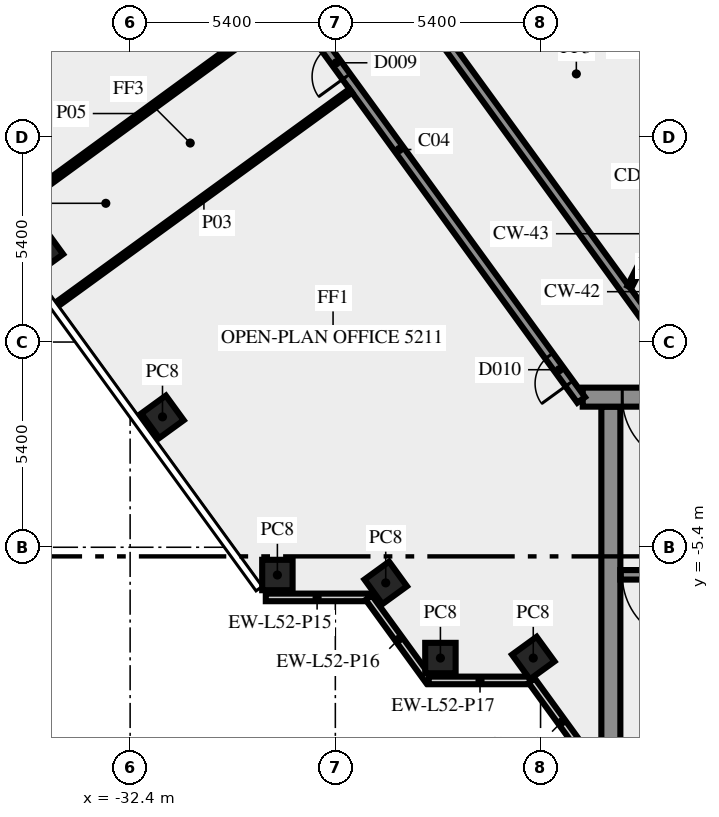
"""IFC4 building model, lengths in metres.
Left out: names, types, materials, properties, quantities, classifications, styles, units other than length and angle.
Written with IfcOpenShell. Run it as: python <this file> out.ifc"""

import sys

from ifc_helpers import new_model, si_unit, direction, frame, frame_2d, origin, origin_2d, place, context, subcontext, project, spatial, rectangle, extrude, element, fill, save


model = new_model("IFC4")
c1 = context("Model", 3, precision=1e-05, world=origin(), true_north=direction((0.0, 1.0)))
c2 = subcontext(c1, "Body", "Model", "MODEL_VIEW")
j1 = project(units=[si_unit("LENGTHUNIT", "METRE"), si_unit("PLANEANGLEUNIT", "RADIAN")], contexts=[c1])
p1 = place(None, origin())
s1 = spatial("IfcSite", under=j1, at=p1, CompositionType="ELEMENT")
p2 = place(p1, origin())
s2 = spatial("IfcBuilding", under=s1, at=p2, CompositionType="ELEMENT")
p3 = place(p2, frame((0.0, 0.0, 222.0)))
s3 = spatial("IfcBuildingStorey", under=s2, at=p3, CompositionType="ELEMENT", Elevation=222.0)
for number, where, z_axis, x_axis in (
    (1, (-34.722, 2.4, 0.0), (0.0, 0.0, 1.0), (0.588, -0.809, 0.0)),
    (2, (-31.548, -1.969, 0.0), (0.0, 0.0, 1.0), (0.588, -0.809, 0.0)),
    (3, (-28.525, -6.13, 0.0), (0.0, 0.0, 1.0), (1.0, 0.0, 0.0)),
    (4, (-25.674, -6.337, 0.0), (0.0, 0.0, 1.0), (0.588, -0.809, 0.0)),
    (5, (-24.235, -8.315, 0.0), (0.0, 0.0, 1.0), (1.0, 0.0, 0.0)),
    (6, (-21.792, -8.315, 0.0), (0.0, 0.0, 1.0), (0.588, -0.809, 0.0)),
):
    element("IfcColumn", number, at=place(p3, frame(where, z_axis=z_axis, x_axis=x_axis)), inside=s3, PredefinedType="COLUMN", context=c2, shape_type="SweptSolid", body=[
        extrude(rectangle(XDim=0.8, YDim=0.8, at=origin_2d()), origin(), (0.0, 0.0, 1.0), 3.65),
    ])
p4 = place(p3, frame((-28.83, -6.719, 0.0), z_axis=(0.0, 0.0, 1.0), x_axis=(1.0, 0.0, 0.0)))
e7 = element("IfcWall", 7, at=p4, inside=s3, PredefinedType="SOLIDWALL", context=c2, shape_type="SweptSolid", body=[
    extrude(rectangle(XDim=2.7, YDim=0.2, at=frame_2d((1.35, 0.0))), origin(), (0.0, 0.0, 1.0), 3.65),
])
p5 = place(p3, frame((-26.12, -6.724, 0.0), z_axis=(0.0, 0.0, 1.0), x_axis=(0.587720002413, -0.809064397168, 0.0)))
e8 = element("IfcWall", 8, at=p5, inside=s3, PredefinedType="SOLIDWALL", context=c2, shape_type="SweptSolid", body=[
    extrude(rectangle(XDim=2.7, YDim=0.2, at=frame_2d((1.35, 0.0))), origin(), (0.0, 0.0, 1.0), 3.65),
])
p6 = place(p3, frame((-24.543, -8.904, 0.0), z_axis=(0.0, 0.0, 1.0), x_axis=(1.0, 0.0, 0.0)))
e9 = element("IfcWall", 9, at=p6, inside=s3, PredefinedType="SOLIDWALL", context=c2, shape_type="SweptSolid", body=[
    extrude(rectangle(XDim=2.7, YDim=0.2, at=frame_2d((1.35, 0.0))), origin(), (0.0, 0.0, 1.0), 3.65),
])
p7 = place(p3, frame((-21.833, -8.909, 0.0), z_axis=(0.0, 0.0, 1.0), x_axis=(0.587766567315, -0.809030569476, 0.0)))
e10 = element("IfcWall", 10, at=p7, inside=s3, PredefinedType="SOLIDWALL", context=c2, shape_type="SweptSolid", body=[
    extrude(rectangle(XDim=2.688, YDim=0.2, at=frame_2d((1.344, 0.0))), origin(), (0.0, 0.0, 1.0), 3.65),
])
p8 = place(p3, frame((-19.75, -10.5, 0.0), z_axis=(0.0, 0.0, 1.0), x_axis=(0.0, 1.0, 0.0)))
e11 = element("IfcWall", 11, at=p8, inside=s3, PredefinedType="SHEAR", context=c2, shape_type="SweptSolid", body=[
    extrude(rectangle(XDim=8.8, YDim=0.5, at=frame_2d((4.4, 0.0))), origin(), (0.0, 0.0, 1.0), 3.65),
])
p9 = place(p3, frame((-11.45, -6.125, 0.0), z_axis=(0.0, 0.0, 1.0), x_axis=(-1.0, 0.0, 0.0)))
e12 = element("IfcWall", 12, at=p9, inside=s3, PredefinedType="SHEAR", context=c2, shape_type="SweptSolid", body=[
    extrude(rectangle(XDim=8.05, YDim=0.25, at=frame_2d((4.025, 0.0))), origin(), (0.0, 0.0, 1.0), 3.65),
])
p10 = place(p9, frame((6.2, 0.0, 0.0)))
e13 = element("IfcOpeningElement", 13, at=p10, cuts=e12, PredefinedType="OPENING", context=c2, shape_type="SweptSolid", body=[
    extrude(rectangle(XDim=1.8, YDim=2.1, at=frame_2d((0.9, 1.05))), frame((0.0, 0.135, 0.0), z_axis=(0.0, -1.0, 0.0), x_axis=(1.0, 0.0, 0.0)), (0.0, 0.0, 1.0), 0.27),
])
p11 = place(p3, frame((20.49, -1.45, 0.0), z_axis=(0.0, 0.0, 1.0), x_axis=(-1.0, 0.0, 0.0)))
e14 = element("IfcWall", 14, at=p11, inside=s3, PredefinedType="SHEAR", context=c2, shape_type="SweptSolid", body=[
    extrude(rectangle(XDim=40.98, YDim=0.5, at=frame_2d((20.49, 0.0))), origin(), (0.0, 0.0, 1.0), 3.65),
])
p12 = place(p11, frame((38.14, 0.0, 0.0)))
e15 = element("IfcOpeningElement", 15, at=p12, cuts=e14, PredefinedType="OPENING", context=c2, shape_type="SweptSolid", body=[
    extrude(rectangle(XDim=1.8, YDim=2.1, at=frame_2d((0.9, 1.05))), frame((0.0, 0.26, 0.0), z_axis=(0.0, -1.0, 0.0), x_axis=(1.0, 0.0, 0.0)), (0.0, 0.0, 1.0), 0.52),
])
p13 = place(p11, frame((36.728, 0.0, 0.0)))
e16 = element("IfcOpeningElement", 16, at=p13, cuts=e14, PredefinedType="OPENING", context=c2, shape_type="SweptSolid", body=[
    extrude(rectangle(XDim=0.8, YDim=2.1, at=frame_2d((0.4, 1.05))), frame((0.0, 0.26, 0.0), z_axis=(0.0, -1.0, 0.0), x_axis=(1.0, 0.0, 0.0)), (0.0, 0.0, 1.0), 0.52),
])
p14 = place(p11, frame((35.153, 0.0, 0.0)))
e17 = element("IfcOpeningElement", 17, at=p14, cuts=e14, PredefinedType="OPENING", context=c2, shape_type="SweptSolid", body=[
    extrude(rectangle(XDim=0.8, YDim=2.1, at=frame_2d((0.4, 1.05))), frame((0.0, 0.26, 0.0), z_axis=(0.0, -1.0, 0.0), x_axis=(1.0, 0.0, 0.0)), (0.0, 0.0, 1.0), 0.52),
])
p15 = place(p11, frame((32.94, 0.0, 0.0)))
e18 = element("IfcOpeningElement", 18, at=p15, cuts=e14, PredefinedType="OPENING", context=c2, shape_type="SweptSolid", body=[
    extrude(rectangle(XDim=0.9, YDim=2.1, at=frame_2d((0.45, 1.05))), frame((0.0, 0.26, 0.0), z_axis=(0.0, -1.0, 0.0), x_axis=(1.0, 0.0, 0.0)), (0.0, 0.0, 1.0), 0.52),
])
p16 = place(p11, frame((30.202, 0.0, 0.0)))
e19 = element("IfcOpeningElement", 19, at=p16, cuts=e14, PredefinedType="OPENING", context=c2, shape_type="SweptSolid", body=[
    extrude(rectangle(XDim=0.9, YDim=2.1, at=frame_2d((0.45, 1.05))), frame((0.0, 0.26, 0.0), z_axis=(0.0, -1.0, 0.0), x_axis=(1.0, 0.0, 0.0)), (0.0, 0.0, 1.0), 0.52),
])
p17 = place(p11, frame((27.74, 0.0, 0.0)))
e20 = element("IfcOpeningElement", 20, at=p17, cuts=e14, PredefinedType="OPENING", context=c2, shape_type="SweptSolid", body=[
    extrude(rectangle(XDim=0.9, YDim=2.1, at=frame_2d((0.45, 1.05))), frame((0.0, 0.26, 0.0), z_axis=(0.0, -1.0, 0.0), x_axis=(1.0, 0.0, 0.0)), (0.0, 0.0, 1.0), 0.52),
])
p18 = place(p11, frame((25.377, 0.0, 0.0)))
e21 = element("IfcOpeningElement", 21, at=p18, cuts=e14, PredefinedType="OPENING", context=c2, shape_type="SweptSolid", body=[
    extrude(rectangle(XDim=0.9, YDim=2.1, at=frame_2d((0.45, 1.05))), frame((0.0, 0.26, 0.0), z_axis=(0.0, -1.0, 0.0), x_axis=(1.0, 0.0, 0.0)), (0.0, 0.0, 1.0), 0.52),
])
p19 = place(p11, frame((20.74, 0.0, 0.0)))
e22 = element("IfcOpeningElement", 22, at=p19, cuts=e14, PredefinedType="OPENING", context=c2, shape_type="SweptSolid", body=[
    extrude(rectangle(XDim=2.0, YDim=2.1, at=frame_2d((1.0, 1.05))), frame((0.0, 0.26, 0.0), z_axis=(0.0, -1.0, 0.0), x_axis=(1.0, 0.0, 0.0)), (0.0, 0.0, 1.0), 0.52),
])
p20 = place(p11, frame((7.14, 0.0, 0.0)))
e23 = element("IfcOpeningElement", 23, at=p20, cuts=e14, PredefinedType="OPENING", context=c2, shape_type="SweptSolid", body=[
    extrude(rectangle(XDim=0.9, YDim=2.1, at=frame_2d((0.45, 1.05))), frame((0.0, 0.26, 0.0), z_axis=(0.0, -1.0, 0.0), x_axis=(1.0, 0.0, 0.0)), (0.0, 0.0, 1.0), 0.52),
])
p21 = place(p11, frame((4.19, 0.0, 0.0)))
e24 = element("IfcOpeningElement", 24, at=p21, cuts=e14, PredefinedType="OPENING", context=c2, shape_type="SweptSolid", body=[
    extrude(rectangle(XDim=0.9, YDim=2.1, at=frame_2d((0.45, 1.05))), frame((0.0, 0.26, 0.0), z_axis=(0.0, -1.0, 0.0), x_axis=(1.0, 0.0, 0.0)), (0.0, 0.0, 1.0), 0.52),
])
p22 = place(p11, frame((1.04, 0.0, 0.0)))
e25 = element("IfcOpeningElement", 25, at=p22, cuts=e14, PredefinedType="OPENING", context=c2, shape_type="SweptSolid", body=[
    extrude(rectangle(XDim=1.8, YDim=2.1, at=frame_2d((0.9, 1.05))), frame((0.0, 0.26, 0.0), z_axis=(0.0, -1.0, 0.0), x_axis=(1.0, 0.0, 0.0)), (0.0, 0.0, 1.0), 0.52),
])
p23 = place(p3, frame((-20.531, -1.523, 0.0), z_axis=(0.0, 0.0, 1.0), x_axis=(-0.587784239999, 0.809017729849, 0.0)))
e26 = element("IfcWall", 26, at=p23, inside=s3, PredefinedType="SOLIDWALL", context=c2, shape_type="SweptSolid", body=[
    extrude(rectangle(XDim=23.271, YDim=0.25, at=frame_2d((11.635, 0.0))), origin(), (0.0, 0.0, 1.0), 3.65),
])
p24 = place(p23, frame((0.533, 0.0, 0.0)))
e27 = element("IfcOpeningElement", 27, at=p24, cuts=e26, PredefinedType="OPENING", context=c2, shape_type="SweptSolid", body=[
    extrude(rectangle(XDim=0.9, YDim=2.1, at=frame_2d((0.45, 1.05))), frame((0.0, 0.135, 0.0), z_axis=(0.0, -1.0, 0.0), x_axis=(1.0, 0.0, 0.0)), (0.0, 0.0, 1.0), 0.27),
])
p25 = place(p23, frame((17.106, 0.0, 0.0)))
e28 = element("IfcOpeningElement", 28, at=p25, cuts=e26, PredefinedType="OPENING", context=c2, shape_type="SweptSolid", body=[
    extrude(rectangle(XDim=1.8, YDim=2.1, at=frame_2d((0.9, 1.05))), frame((0.0, 0.135, 0.0), z_axis=(0.0, -1.0, 0.0), x_axis=(1.0, 0.0, 0.0)), (0.0, 0.0, 1.0), 0.27),
])
p26 = place(p23, frame((10.516, 0.0, 0.0)))
e29 = element("IfcOpeningElement", 29, at=p26, cuts=e26, PredefinedType="OPENING", context=c2, shape_type="SweptSolid", body=[
    extrude(rectangle(XDim=0.9, YDim=2.1, at=frame_2d((0.45, 1.05))), frame((0.0, 0.135, 0.0), z_axis=(0.0, -1.0, 0.0), x_axis=(1.0, 0.0, 0.0)), (0.0, 0.0, 1.0), 0.27),
])
p27 = place(p3, frame((-31.918, 18.658, 0.0), z_axis=(0.0, 0.0, 1.0), x_axis=(0.587788731405, -0.80901446664, 0.0)))
e30 = element("IfcWall", 30, at=p27, inside=s3, PredefinedType="SOLIDWALL", context=c2, shape_type="SweptSolid", body=[
    extrude(rectangle(XDim=24.453, YDim=0.25, at=frame_2d((12.227, 0.0))), origin(), (0.0, 0.0, 1.0), 3.65),
])
p28 = place(p27, frame((8.395, 0.0, 0.0)))
e31 = element("IfcOpeningElement", 31, at=p28, cuts=e30, PredefinedType="OPENING", context=c2, shape_type="SweptSolid", body=[
    extrude(rectangle(XDim=1.0, YDim=2.1, at=frame_2d((0.5, 1.05))), frame((0.0, 0.135, 0.0), z_axis=(0.0, -1.0, 0.0), x_axis=(1.0, 0.0, 0.0)), (0.0, 0.0, 1.0), 0.27),
])
p29 = place(p27, frame((10.095, 0.0, 0.0)))
e32 = element("IfcOpeningElement", 32, at=p29, cuts=e30, PredefinedType="OPENING", context=c2, shape_type="SweptSolid", body=[
    extrude(rectangle(XDim=0.9, YDim=2.1, at=frame_2d((0.45, 1.05))), frame((0.0, 0.135, 0.0), z_axis=(0.0, -1.0, 0.0), x_axis=(1.0, 0.0, 0.0)), (0.0, 0.0, 1.0), 0.27),
])
p30 = place(p3, frame((-26.595, 6.611, 0.0), z_axis=(0.0, 0.0, 1.0), x_axis=(-0.80900684162, -0.587799226107, 0.0)))
e33 = element("IfcWall", 33, at=p30, inside=s3, PredefinedType="PARTITIONING", context=c2, shape_type="SweptSolid", body=[
    extrude(rectangle(XDim=9.55, YDim=0.12, at=frame_2d((4.775, 0.0))), origin(), (0.0, 0.0, 1.0), 2.85),
])
p31 = place(p3, frame((-35.919, 3.197, 0.0), z_axis=(0.0, 0.0, 1.0), x_axis=(0.807645841498, 0.589667868135, 0.0)))
e34 = element("IfcWall", 34, at=p31, inside=s3, PredefinedType="PARTITIONING", context=c2, shape_type="SweptSolid", body=[
    extrude(rectangle(XDim=9.551, YDim=0.15, at=frame_2d((4.775, 0.0))), origin(), (0.0, 0.0, 1.0), 2.85),
])
p32 = place(p3, frame((-19.261, 1.45, 0.0), z_axis=(0.0, 0.0, 1.0), x_axis=(0.453950796792, 0.891026752736, 0.0)))
e35 = element("IfcWall", 35, at=p32, inside=s3, PredefinedType="PARTITIONING", context=c2, shape_type="SweptSolid", body=[
    extrude(rectangle(XDim=2.778, YDim=0.12, at=frame_2d((1.389, 0.0))), origin(), (0.0, 0.0, 1.0), 3.65),
])
p33 = place(p10, origin())
e36 = element("IfcDoor", 36, at=p33, inside=s3, OperationType="DOUBLE_DOOR_SINGLE_SWING", PredefinedType="DOOR", context=c2, shape_type="SweptSolid", body=[
    extrude(rectangle(XDim=1.8, YDim=2.1, at=frame_2d((0.9, 1.05))), frame((0.0, 0.025, 0.0), z_axis=(0.0, -1.0, 0.0), x_axis=(1.0, 0.0, 0.0)), (0.0, 0.0, 1.0), 0.05),
])
fill(e13, e36)
p34 = place(p12, origin())
e37 = element("IfcDoor", 37, at=p34, inside=s3, OperationType="DOUBLE_DOOR_SINGLE_SWING", PredefinedType="DOOR", context=c2, shape_type="SweptSolid", body=[
    extrude(rectangle(XDim=1.8, YDim=2.1, at=frame_2d((0.9, 1.05))), frame((0.0, 0.025, 0.0), z_axis=(0.0, -1.0, 0.0), x_axis=(1.0, 0.0, 0.0)), (0.0, 0.0, 1.0), 0.05),
])
fill(e15, e37)
p35 = place(p24, origin())
e38 = element("IfcDoor", 38, at=p35, inside=s3, OperationType="SINGLE_SWING_LEFT", PredefinedType="DOOR", context=c2, shape_type="SweptSolid", body=[
    extrude(rectangle(XDim=0.9, YDim=2.1, at=frame_2d((0.45, 1.05))), frame((0.0, 0.025, 0.0), z_axis=(0.0, -1.0, 0.0), x_axis=(1.0, 0.0, 0.0)), (0.0, 0.0, 1.0), 0.05),
])
fill(e27, e38)
p36 = place(p26, origin())
e39 = element("IfcDoor", 39, at=p36, inside=s3, OperationType="SINGLE_SWING_LEFT", PredefinedType="DOOR", context=c2, shape_type="SweptSolid", body=[
    extrude(rectangle(XDim=0.9, YDim=2.1, at=frame_2d((0.45, 1.05))), frame((0.0, 0.025, 0.0), z_axis=(0.0, -1.0, 0.0), x_axis=(1.0, 0.0, 0.0)), (0.0, 0.0, 1.0), 0.05),
])
fill(e29, e39)
save(model, sys.argv[1])
